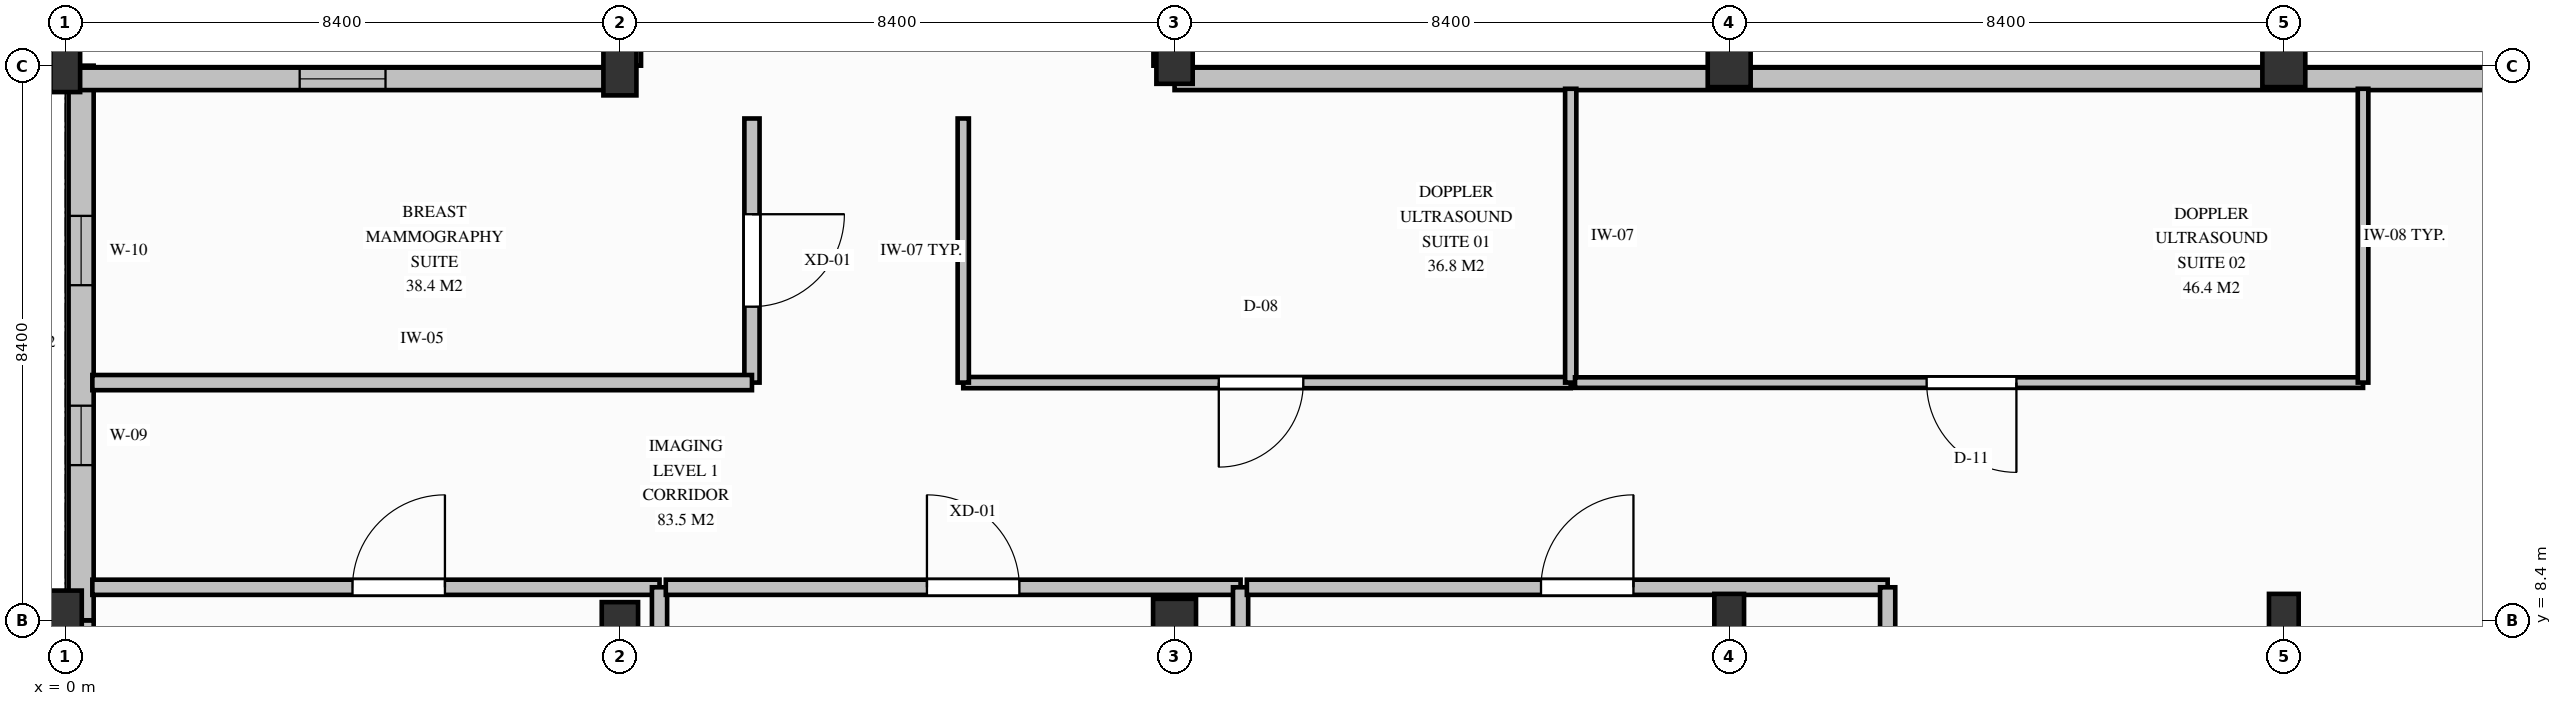
"""IFC4 building model, lengths in metres.
Left out: names, types, materials, properties, quantities, classifications, styles, units other than length and angle.
Written with IfcOpenShell. Run it as: python <this file> out.ifc"""

import sys

from ifc_helpers import new_model, si_unit, direction, frame, frame_2d, origin, origin_2d, place, context, subcontext, project, spatial, rectangle, circle, extrude, element, fill, save


model = new_model("IFC4")
c1 = context("Model", 3, precision=1e-05, world=origin(), true_north=direction((0.0, 1.0)))
c2 = subcontext(c1, "Body", "Model", "MODEL_VIEW")
j1 = project(units=[si_unit("LENGTHUNIT", "METRE"), si_unit("PLANEANGLEUNIT", "RADIAN")], contexts=[c1])
p1 = place(None, origin())
s1 = spatial("IfcSite", under=j1, at=p1, CompositionType="ELEMENT")
p2 = place(p1, origin())
s2 = spatial("IfcBuilding", under=s1, at=p2, CompositionType="ELEMENT")
p3 = place(p2, frame((0.0, 0.0, 4.5)))
s3 = spatial("IfcBuildingStorey", under=s2, at=p3, CompositionType="ELEMENT", Elevation=4.5)
p4 = place(p3, frame((0.0, 8.4, 0.0), z_axis=(0.0, 0.0, 1.0), x_axis=(1.0, 0.0, 0.0)))
e1 = element("IfcColumn", 1, at=p4, inside=s3, PredefinedType="COLUMN", context=c2, shape_type="SweptSolid", body=[
    extrude(rectangle(XDim=0.5, YDim=0.9, at=origin_2d()), origin(), (0.0, 0.0, 1.0), 4.5),
])
p5 = place(p3, frame((0.0, 16.8, 0.0), z_axis=(0.0, 0.0, 1.0), x_axis=(1.0, 0.0, 0.0)))
e2 = element("IfcColumn", 2, at=p5, inside=s3, PredefinedType="COLUMN", context=c2, shape_type="SweptSolid", body=[
    extrude(rectangle(XDim=0.45, YDim=0.8, at=origin_2d()), origin(), (0.0, 0.0, 1.0), 4.5),
])
p6 = place(p3, frame((8.4, 8.4, 0.0), z_axis=(0.0, 0.0, 1.0), x_axis=(1.0, 0.0, 0.0)))
e3 = element("IfcColumn", 3, at=p6, inside=s3, PredefinedType="COLUMN", context=c2, shape_type="SweptSolid", body=[
    extrude(circle(Radius=0.275, at=origin_2d()), origin(), (0.0, 0.0, 1.0), 4.5),
])
p7 = place(p3, frame((8.4, 16.8, 0.0), z_axis=(0.0, 0.0, 1.0), x_axis=(1.0, 0.0, 0.0)))
e4 = element("IfcColumn", 4, at=p7, inside=s3, PredefinedType="COLUMN", context=c2, shape_type="SweptSolid", body=[
    extrude(rectangle(XDim=0.5, YDim=0.9, at=origin_2d()), origin(), (0.0, 0.0, 1.0), 4.5),
])
p8 = place(p3, frame((16.8, 8.4, 0.0), z_axis=(0.0, 0.0, 1.0), x_axis=(1.0, 0.0, 0.0)))
e5 = element("IfcColumn", 5, at=p8, inside=s3, PredefinedType="COLUMN", context=c2, shape_type="SweptSolid", body=[
    extrude(circle(Radius=0.325, at=origin_2d()), origin(), (0.0, 0.0, 1.0), 4.5),
])
p9 = place(p3, frame((16.8, 16.8, 0.0), z_axis=(0.0, 0.0, 1.0), x_axis=(1.0, 0.0, 0.0)))
e6 = element("IfcColumn", 6, at=p9, inside=s3, PredefinedType="COLUMN", context=c2, shape_type="SweptSolid", body=[
    extrude(circle(Radius=0.275, at=origin_2d()), origin(), (0.0, 0.0, 1.0), 4.5),
])
p10 = place(p3, frame((25.2, 8.4, 0.0), z_axis=(0.0, 0.0, 1.0), x_axis=(1.0, 0.0, 0.0)))
e7 = element("IfcColumn", 7, at=p10, inside=s3, PredefinedType="COLUMN", context=c2, shape_type="SweptSolid", body=[
    extrude(rectangle(XDim=0.45, YDim=0.8, at=origin_2d()), origin(), (0.0, 0.0, 1.0), 4.5),
])
p11 = place(p3, frame((25.2, 16.8, 0.0), z_axis=(0.0, 0.0, 1.0), x_axis=(1.0, 0.0, 0.0)))
e8 = element("IfcColumn", 8, at=p11, inside=s3, PredefinedType="COLUMN", context=c2, shape_type="SweptSolid", body=[
    extrude(circle(Radius=0.325, at=origin_2d()), origin(), (0.0, 0.0, 1.0), 4.5),
])
p12 = place(p3, frame((33.6, 8.4, 0.0), z_axis=(0.0, 0.0, 1.0), x_axis=(1.0, 0.0, 0.0)))
e9 = element("IfcColumn", 9, at=p12, inside=s3, PredefinedType="COLUMN", context=c2, shape_type="SweptSolid", body=[
    extrude(rectangle(XDim=0.45, YDim=0.8, at=origin_2d()), origin(), (0.0, 0.0, 1.0), 4.5),
])
p13 = place(p3, frame((33.6, 16.8, 0.0), z_axis=(0.0, 0.0, 1.0), x_axis=(1.0, 0.0, 0.0)))
e10 = element("IfcColumn", 10, at=p13, inside=s3, PredefinedType="COLUMN", context=c2, shape_type="SweptSolid", body=[
    extrude(circle(Radius=0.325, at=origin_2d()), origin(), (0.0, 0.0, 1.0), 4.5),
])
p14 = place(p3, frame((0.24, 0.0, 0.0), z_axis=(0.0, 0.0, 1.0), x_axis=(0.0, 1.0, 0.0)))
e11 = element("IfcWall", 11, at=p14, inside=s3, PredefinedType="SOLIDWALL", context=c2, shape_type="SweptSolid", body=[
    extrude(rectangle(XDim=8.4, YDim=0.38, at=frame_2d((4.2, 0.0))), origin(), (0.0, 0.0, 1.0), 2.868),
])
p15 = place(p14, frame((2.35, 0.0, 0.85)))
e12 = element("IfcOpeningElement", 12, at=p15, cuts=e11, PredefinedType="OPENING", context=c2, shape_type="SweptSolid", body=[
    extrude(rectangle(XDim=0.9, YDim=1.8, at=frame_2d((0.45, 0.9))), frame((0.0, 0.2, 0.0), z_axis=(0.0, -1.0, 0.0), x_axis=(1.0, 0.0, 0.0)), (0.0, 0.0, 1.0), 0.4),
])
p16 = place(p14, frame((5.075, 0.0, 0.85)))
e13 = element("IfcOpeningElement", 13, at=p16, cuts=e11, PredefinedType="OPENING", context=c2, shape_type="SweptSolid", body=[
    extrude(rectangle(XDim=1.05, YDim=1.75, at=frame_2d((0.525, 0.875))), frame((0.0, 0.2, 0.0), z_axis=(0.0, -1.0, 0.0), x_axis=(1.0, 0.0, 0.0)), (0.0, 0.0, 1.0), 0.4),
])
p17 = place(p3, frame((0.24, 8.4, 0.0), z_axis=(0.0, 0.0, 1.0), x_axis=(0.0, 1.0, 0.0)))
e14 = element("IfcWall", 14, at=p17, inside=s3, PredefinedType="SOLIDWALL", context=c2, shape_type="SweptSolid", body=[
    extrude(rectangle(XDim=8.4, YDim=0.38, at=frame_2d((4.2, 0.0))), origin(), (0.0, 0.0, 1.0), 3.978),
])
p18 = place(p17, frame((2.35, 0.0, 0.85)))
e15 = element("IfcOpeningElement", 15, at=p18, cuts=e14, PredefinedType="OPENING", context=c2, shape_type="SweptSolid", body=[
    extrude(rectangle(XDim=0.9, YDim=1.8, at=frame_2d((0.45, 0.9))), frame((0.0, 0.2, 0.0), z_axis=(0.0, -1.0, 0.0), x_axis=(1.0, 0.0, 0.0)), (0.0, 0.0, 1.0), 0.4),
])
p19 = place(p17, frame((5.075, 0.0, 0.85)))
e16 = element("IfcOpeningElement", 16, at=p19, cuts=e14, PredefinedType="OPENING", context=c2, shape_type="SweptSolid", body=[
    extrude(rectangle(XDim=1.05, YDim=1.75, at=frame_2d((0.525, 0.875))), frame((0.0, 0.2, 0.0), z_axis=(0.0, -1.0, 0.0), x_axis=(1.0, 0.0, 0.0)), (0.0, 0.0, 1.0), 0.4),
])
p20 = place(p3, frame((0.0, 16.6, 0.0), z_axis=(0.0, 0.0, 1.0), x_axis=(1.0, 0.0, 0.0)))
e17 = element("IfcWall", 17, at=p20, inside=s3, PredefinedType="SOLIDWALL", context=c2, shape_type="SweptSolid", body=[
    extrude(rectangle(XDim=8.4, YDim=0.34, at=frame_2d((4.2, 0.0))), origin(), (0.0, 0.0, 1.0), 3.628),
])
p21 = place(p20, frame((3.55, 0.0, 0.85)))
e18 = element("IfcOpeningElement", 18, at=p21, cuts=e17, PredefinedType="OPENING", context=c2, shape_type="SweptSolid", body=[
    extrude(rectangle(XDim=1.3, YDim=1.65, at=frame_2d((0.65, 0.825))), frame((0.0, 0.18, 0.0), z_axis=(0.0, -1.0, 0.0), x_axis=(1.0, 0.0, 0.0)), (0.0, 0.0, 1.0), 0.36),
])
p22 = place(p3, frame((16.8, 16.6, 0.0), z_axis=(0.0, 0.0, 1.0), x_axis=(1.0, 0.0, 0.0)))
e19 = element("IfcWall", 19, at=p22, inside=s3, PredefinedType="SOLIDWALL", context=c2, shape_type="SweptSolid", body=[
    extrude(rectangle(XDim=24.6, YDim=0.34, at=frame_2d((12.3, 0.0))), origin(), (0.0, 0.0, 1.0), 3.628),
])
p23 = place(p3, frame((8.55, 16.8, 0.0), z_axis=(0.0, 0.0, 1.0), x_axis=(0.0, 1.0, 0.0)))
e20 = element("IfcWall", 20, at=p23, inside=s3, PredefinedType="SOLIDWALL", context=c2, shape_type="SweptSolid", body=[
    extrude(rectangle(XDim=8.4, YDim=0.34, at=frame_2d((4.2, 0.0))), origin(), (0.0, 0.0, 1.0), 3.628),
])
p24 = place(p23, frame((3.55, 0.0, 0.85)))
e21 = element("IfcOpeningElement", 21, at=p24, cuts=e20, PredefinedType="OPENING", context=c2, shape_type="SweptSolid", body=[
    extrude(rectangle(XDim=1.3, YDim=1.65, at=frame_2d((0.65, 0.825))), frame((0.0, 0.18, 0.0), z_axis=(0.0, -1.0, 0.0), x_axis=(1.0, 0.0, 0.0)), (0.0, 0.0, 1.0), 0.36),
])
p25 = place(p3, frame((16.65, 25.2, 0.0), z_axis=(0.0, 0.0, 1.0), x_axis=(0.0, -1.0, 0.0)))
e22 = element("IfcWall", 22, at=p25, inside=s3, PredefinedType="SOLIDWALL", context=c2, shape_type="SweptSolid", body=[
    extrude(rectangle(XDim=8.4, YDim=0.34, at=frame_2d((4.2, 0.0))), origin(), (0.0, 0.0, 1.0), 3.678),
])
p26 = place(p25, frame((3.475, 0.0, 0.85)))
e23 = element("IfcOpeningElement", 23, at=p26, cuts=e22, PredefinedType="OPENING", context=c2, shape_type="SweptSolid", body=[
    extrude(rectangle(XDim=1.45, YDim=1.75, at=frame_2d((0.725, 0.875))), frame((0.0, 0.18, 0.0), z_axis=(0.0, -1.0, 0.0), x_axis=(1.0, 0.0, 0.0)), (0.0, 0.0, 1.0), 0.36),
])
p27 = place(p3, frame((41.4, 8.4, 0.0), z_axis=(0.0, 0.0, 1.0), x_axis=(-0.680446197767, -0.732798043082, 0.0)))
e24 = element("IfcWall", 24, at=p27, inside=s3, PredefinedType="SOLIDWALL", context=c2, shape_type="SweptSolid", body=[
    extrude(rectangle(XDim=11.463, YDim=0.38, at=frame_2d((5.731, 0.0))), origin(), (0.0, 0.0, 1.0), 2.868),
])
p28 = place(p27, frame((4.757, 0.0, 0.85)))
e25 = element("IfcOpeningElement", 25, at=p28, cuts=e24, PredefinedType="OPENING", context=c2, shape_type="SweptSolid", body=[
    extrude(rectangle(XDim=1.95, YDim=1.8, at=frame_2d((0.975, 0.9))), frame((0.0, 0.2, 0.0), z_axis=(0.0, -1.0, 0.0), x_axis=(1.0, 0.0, 0.0)), (0.0, 0.0, 1.0), 0.4),
])
p29 = place(p3, frame((0.41, 8.9, 0.0), z_axis=(0.0, 0.0, 1.0), x_axis=(1.0, 0.0, 0.0)))
e26 = element("IfcWall", 26, at=p29, inside=s3, PredefinedType="PARTITIONING", context=c2, shape_type="SweptSolid", body=[
    extrude(rectangle(XDim=8.59, YDim=0.23, at=frame_2d((4.295, 0.0))), origin(), (0.0, 0.0, 1.0), 3.678),
])
p30 = place(p29, frame((3.94, 0.0, 0.0)))
e27 = element("IfcOpeningElement", 27, at=p30, cuts=e26, PredefinedType="OPENING", context=c2, shape_type="SweptSolid", body=[
    extrude(rectangle(XDim=1.4, YDim=2.2, at=frame_2d((0.7, 1.1))), frame((0.0, 0.125, 0.0), z_axis=(0.0, -1.0, 0.0), x_axis=(1.0, 0.0, 0.0)), (0.0, 0.0, 1.0), 0.25),
])
p31 = place(p3, frame((9.0, 8.9, 0.0), z_axis=(0.0, 0.0, 1.0), x_axis=(0.0, -1.0, 0.0)))
e28 = element("IfcWall", 28, at=p31, inside=s3, PredefinedType="PARTITIONING", context=c2, shape_type="SweptSolid", body=[
    extrude(rectangle(XDim=8.47, YDim=0.23, at=frame_2d((4.235, 0.0))), origin(), (0.0, 0.0, 1.0), 3.728),
])
p32 = place(p3, frame((9.095, 8.9, 0.0), z_axis=(0.0, 0.0, 1.0), x_axis=(1.0, 0.0, 0.0)))
e29 = element("IfcWall", 29, at=p32, inside=s3, PredefinedType="PARTITIONING", context=c2, shape_type="SweptSolid", body=[
    extrude(rectangle(XDim=8.705, YDim=0.23, at=frame_2d((4.353, 0.0))), origin(), (0.0, 0.0, 1.0), 3.948),
])
p33 = place(p32, frame((3.955, 0.0, 0.0)))
e30 = element("IfcOpeningElement", 30, at=p33, cuts=e29, PredefinedType="OPENING", context=c2, shape_type="SweptSolid", body=[
    extrude(rectangle(XDim=1.4, YDim=2.2, at=frame_2d((0.7, 1.1))), frame((0.0, 0.125, 0.0), z_axis=(0.0, -1.0, 0.0), x_axis=(1.0, 0.0, 0.0)), (0.0, 0.0, 1.0), 0.25),
])
p34 = place(p3, frame((17.8, 8.9, 0.0), z_axis=(0.0, 0.0, 1.0), x_axis=(0.0, -1.0, 0.0)))
e31 = element("IfcWall", 31, at=p34, inside=s3, PredefinedType="PARTITIONING", context=c2, shape_type="SweptSolid", body=[
    extrude(rectangle(XDim=8.47, YDim=0.23, at=frame_2d((4.235, 0.0))), origin(), (0.0, 0.0, 1.0), 3.778),
])
p35 = place(p3, frame((17.895, 8.9, 0.0), z_axis=(0.0, 0.0, 1.0), x_axis=(1.0, 0.0, 0.0)))
e32 = element("IfcWall", 32, at=p35, inside=s3, PredefinedType="PARTITIONING", context=c2, shape_type="SweptSolid", body=[
    extrude(rectangle(XDim=9.705, YDim=0.23, at=frame_2d((4.853, 0.0))), origin(), (0.0, 0.0, 1.0), 3.888),
])
p36 = place(p35, frame((4.455, 0.0, 0.0)))
e33 = element("IfcOpeningElement", 33, at=p36, cuts=e32, PredefinedType="OPENING", context=c2, shape_type="SweptSolid", body=[
    extrude(rectangle(XDim=1.4, YDim=2.2, at=frame_2d((0.7, 1.1))), frame((0.0, 0.125, 0.0), z_axis=(0.0, -1.0, 0.0), x_axis=(1.0, 0.0, 0.0)), (0.0, 0.0, 1.0), 0.25),
])
p37 = place(p3, frame((27.6, 8.9, 0.0), z_axis=(0.0, 0.0, 1.0), x_axis=(0.0, -1.0, 0.0)))
e34 = element("IfcWall", 34, at=p37, inside=s3, PredefinedType="PARTITIONING", context=c2, shape_type="SweptSolid", body=[
    extrude(rectangle(XDim=8.47, YDim=0.23, at=frame_2d((4.235, 0.0))), origin(), (0.0, 0.0, 1.0), 3.828),
])
p38 = place(p3, frame((10.4, 16.0, 0.0), z_axis=(0.0, 0.0, 1.0), x_axis=(0.0, -1.0, 0.0)))
e35 = element("IfcWall", 35, at=p38, inside=s3, PredefinedType="PARTITIONING", context=c2, shape_type="SweptSolid", body=[
    extrude(rectangle(XDim=4.0, YDim=0.23, at=frame_2d((2.0, 0.0))), origin(), (0.0, 0.0, 1.0), 4.028),
])
p39 = place(p38, frame((1.45, 0.0, 0.0)))
e36 = element("IfcOpeningElement", 36, at=p39, cuts=e35, PredefinedType="OPENING", context=c2, shape_type="SweptSolid", body=[
    extrude(rectangle(XDim=1.4, YDim=2.2, at=frame_2d((0.7, 1.1))), frame((0.0, 0.125, 0.0), z_axis=(0.0, -1.0, 0.0), x_axis=(1.0, 0.0, 0.0)), (0.0, 0.0, 1.0), 0.25),
])
p40 = place(p3, frame((10.4, 12.0, 0.0), z_axis=(0.0, 0.0, 1.0), x_axis=(-1.0, 0.0, 0.0)))
e37 = element("IfcWall", 37, at=p40, inside=s3, PredefinedType="PARTITIONING", context=c2, shape_type="SweptSolid", body=[
    extrude(rectangle(XDim=9.99, YDim=0.23, at=frame_2d((4.995, 0.0))), origin(), (0.0, 0.0, 1.0), 3.678),
])
p41 = place(p3, frame((22.8, 12.0, 0.0), z_axis=(0.0, 0.0, 1.0), x_axis=(-1.0, 0.0, 0.0)))
e38 = element("IfcWall", 38, at=p41, inside=s3, PredefinedType="PARTITIONING", context=c2, shape_type="SweptSolid", body=[
    extrude(rectangle(XDim=9.2, YDim=0.17, at=frame_2d((4.6, 0.0))), origin(), (0.0, 0.0, 1.0), 3.948),
])
p42 = place(p41, frame((4.05, 0.0, 0.0)))
e39 = element("IfcOpeningElement", 39, at=p42, cuts=e38, PredefinedType="OPENING", context=c2, shape_type="SweptSolid", body=[
    extrude(rectangle(XDim=1.28, YDim=2.22, at=frame_2d((0.64, 1.11))), frame((0.0, 0.095, 0.0), z_axis=(0.0, -1.0, 0.0), x_axis=(1.0, 0.0, 0.0)), (0.0, 0.0, 1.0), 0.19),
])
p43 = place(p3, frame((13.6, 12.0, 0.0), z_axis=(0.0, 0.0, 1.0), x_axis=(0.0, 1.0, 0.0)))
e40 = element("IfcWall", 40, at=p43, inside=s3, PredefinedType="PARTITIONING", context=c2, shape_type="SweptSolid", body=[
    extrude(rectangle(XDim=4.0, YDim=0.17, at=frame_2d((2.0, 0.0))), origin(), (0.0, 0.0, 1.0), 4.028),
])
p44 = place(p3, frame((22.8, 16.45, 0.0), z_axis=(0.0, 0.0, 1.0), x_axis=(0.0, -1.0, 0.0)))
e41 = element("IfcWall", 41, at=p44, inside=s3, PredefinedType="PARTITIONING", context=c2, shape_type="SweptSolid", body=[
    extrude(rectangle(XDim=4.45, YDim=0.17, at=frame_2d((2.225, 0.0))), origin(), (0.0, 0.0, 1.0), 3.988),
])
p45 = place(p3, frame((34.8, 12.0, 0.0), z_axis=(0.0, 0.0, 1.0), x_axis=(-1.0, 0.0, 0.0)))
e42 = element("IfcWall", 42, at=p45, inside=s3, PredefinedType="PARTITIONING", context=c2, shape_type="SweptSolid", body=[
    extrude(rectangle(XDim=11.935, YDim=0.16, at=frame_2d((5.968, 0.0))), origin(), (0.0, 0.0, 1.0), 3.888),
])
p46 = place(p45, frame((5.25, 0.0, 0.0)))
e43 = element("IfcOpeningElement", 43, at=p46, cuts=e42, PredefinedType="OPENING", context=c2, shape_type="SweptSolid", body=[
    extrude(rectangle(XDim=1.36, YDim=2.2, at=frame_2d((0.68, 1.1))), frame((0.0, 0.09, 0.0), z_axis=(0.0, -1.0, 0.0), x_axis=(1.0, 0.0, 0.0)), (0.0, 0.0, 1.0), 0.18),
])
p47 = place(p3, frame((34.8, 16.45, 0.0), z_axis=(0.0, 0.0, 1.0), x_axis=(0.0, -1.0, 0.0)))
e44 = element("IfcWall", 44, at=p47, inside=s3, PredefinedType="PARTITIONING", context=c2, shape_type="SweptSolid", body=[
    extrude(rectangle(XDim=4.45, YDim=0.16, at=frame_2d((2.225, 0.0))), origin(), (0.0, 0.0, 1.0), 4.23),
])
p48 = place(p18, origin())
e45 = element("IfcWindow", 45, at=p48, inside=s3, PartitioningType="SINGLE_PANEL", PredefinedType="WINDOW", context=c2, shape_type="SweptSolid", body=[
    extrude(rectangle(XDim=0.9, YDim=1.8, at=frame_2d((0.45, 0.9))), frame((0.0, 0.03, 0.0), z_axis=(0.0, -1.0, 0.0), x_axis=(1.0, 0.0, 0.0)), (0.0, 0.0, 1.0), 0.06),
])
fill(e15, e45)
p49 = place(p19, origin())
e46 = element("IfcWindow", 46, at=p49, inside=s3, PartitioningType="SINGLE_PANEL", PredefinedType="WINDOW", context=c2, shape_type="SweptSolid", body=[
    extrude(rectangle(XDim=1.05, YDim=1.75, at=frame_2d((0.525, 0.875))), frame((0.0, 0.03, 0.0), z_axis=(0.0, -1.0, 0.0), x_axis=(1.0, 0.0, 0.0)), (0.0, 0.0, 1.0), 0.06),
])
fill(e16, e46)
p50 = place(p21, origin())
e47 = element("IfcWindow", 47, at=p50, inside=s3, PartitioningType="SINGLE_PANEL", PredefinedType="WINDOW", context=c2, shape_type="SweptSolid", body=[
    extrude(rectangle(XDim=1.3, YDim=1.65, at=frame_2d((0.65, 0.825))), frame((0.0, 0.03, 0.0), z_axis=(0.0, -1.0, 0.0), x_axis=(1.0, 0.0, 0.0)), (0.0, 0.0, 1.0), 0.06),
])
fill(e18, e47)
p51 = place(p30, origin())
e48 = element("IfcDoor", 48, at=p51, inside=s3, OperationType="SINGLE_SWING_RIGHT", PredefinedType="DOOR", context=c2, shape_type="SweptSolid", body=[
    extrude(rectangle(XDim=1.4, YDim=2.2, at=frame_2d((0.7, 1.1))), frame((0.0, 0.025, 0.0), z_axis=(0.0, -1.0, 0.0), x_axis=(1.0, 0.0, 0.0)), (0.0, 0.0, 1.0), 0.05),
])
fill(e27, e48)
p52 = place(p33, origin())
e49 = element("IfcDoor", 49, at=p52, inside=s3, OperationType="SINGLE_SWING_LEFT", PredefinedType="DOOR", context=c2, shape_type="SweptSolid", body=[
    extrude(rectangle(XDim=1.4, YDim=2.2, at=frame_2d((0.7, 1.1))), frame((0.0, 0.025, 0.0), z_axis=(0.0, -1.0, 0.0), x_axis=(1.0, 0.0, 0.0)), (0.0, 0.0, 1.0), 0.05),
])
fill(e30, e49)
p53 = place(p36, origin())
e50 = element("IfcDoor", 50, at=p53, inside=s3, OperationType="SINGLE_SWING_RIGHT", PredefinedType="DOOR", context=c2, shape_type="SweptSolid", body=[
    extrude(rectangle(XDim=1.4, YDim=2.2, at=frame_2d((0.7, 1.1))), frame((0.0, 0.025, 0.0), z_axis=(0.0, -1.0, 0.0), x_axis=(1.0, 0.0, 0.0)), (0.0, 0.0, 1.0), 0.05),
])
fill(e33, e50)
p54 = place(p39, origin())
e51 = element("IfcDoor", 51, at=p54, inside=s3, OperationType="SINGLE_SWING_LEFT", PredefinedType="DOOR", context=c2, shape_type="SweptSolid", body=[
    extrude(rectangle(XDim=1.4, YDim=2.2, at=frame_2d((0.7, 1.1))), frame((0.0, 0.025, 0.0), z_axis=(0.0, -1.0, 0.0), x_axis=(1.0, 0.0, 0.0)), (0.0, 0.0, 1.0), 0.05),
])
fill(e36, e51)
p55 = place(p42, origin())
e52 = element("IfcDoor", 52, at=p55, inside=s3, OperationType="SINGLE_SWING_RIGHT", PredefinedType="DOOR", context=c2, shape_type="SweptSolid", body=[
    extrude(rectangle(XDim=1.28, YDim=2.22, at=frame_2d((0.64, 1.11))), frame((0.0, 0.025, 0.0), z_axis=(0.0, -1.0, 0.0), x_axis=(1.0, 0.0, 0.0)), (0.0, 0.0, 1.0), 0.05),
])
fill(e39, e52)
p56 = place(p46, origin())
e53 = element("IfcDoor", 53, at=p56, inside=s3, OperationType="SINGLE_SWING_LEFT", PredefinedType="DOOR", context=c2, shape_type="SweptSolid", body=[
    extrude(rectangle(XDim=1.36, YDim=2.2, at=frame_2d((0.68, 1.1))), frame((0.0, 0.025, 0.0), z_axis=(0.0, -1.0, 0.0), x_axis=(1.0, 0.0, 0.0)), (0.0, 0.0, 1.0), 0.05),
])
fill(e43, e53)
save(model, sys.argv[1])
